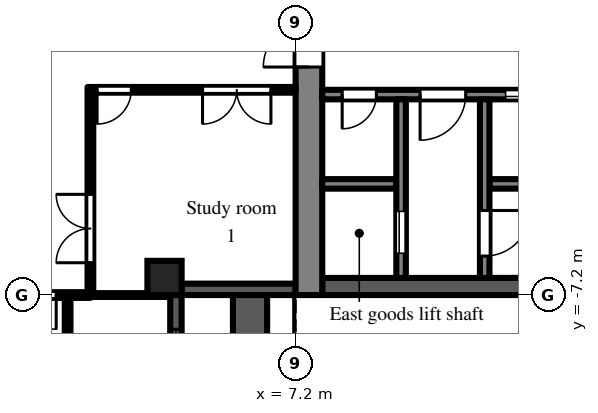
"""IFC4 building model, lengths in metres.
Left out: names, types, materials, properties, quantities, classifications, styles, units other than length and angle.
Written with IfcOpenShell. Run it as: python <this file> out.ifc"""

import sys

from ifc_helpers import new_model, si_unit, direction, frame, frame_2d, origin, origin_2d, place, context, subcontext, project, spatial, rectangle, extrude, element, fill, save


model = new_model("IFC4")
c1 = context("Model", 3, precision=1e-05, world=origin(), true_north=direction((0.0, 1.0)))
c2 = subcontext(c1, "Body", "Model", "MODEL_VIEW")
j1 = project(units=[si_unit("LENGTHUNIT", "METRE"), si_unit("PLANEANGLEUNIT", "RADIAN")], contexts=[c1])
p1 = place(None, origin())
s1 = spatial("IfcSite", under=j1, at=p1, CompositionType="ELEMENT")
p2 = place(p1, origin())
s2 = spatial("IfcBuilding", under=s1, at=p2, CompositionType="ELEMENT")
p3 = place(p2, frame((0.0, 0.0, 116.1)))
s3 = spatial("IfcBuildingStorey", under=s2, at=p3, CompositionType="ELEMENT", Elevation=116.1)
p4 = place(p3, frame((3.75, -6.75, 0.0), z_axis=(0.0, 0.0, 1.0), x_axis=(1.0, 0.0, 0.0)))
e1 = element("IfcColumn", 1, at=p4, inside=s3, PredefinedType="COLUMN", context=c2, shape_type="SweptSolid", body=[
    extrude(rectangle(XDim=0.9, YDim=0.9, at=origin_2d()), origin(), (0.0, 0.0, 1.0), 4.2),
])
p5 = place(p3, frame((4.05, -14.4, 0.0), z_axis=(0.0, 0.0, 1.0), x_axis=(0.0, 1.0, 0.0)))
e2 = element("IfcWall", 2, at=p5, inside=s3, PredefinedType="SOLIDWALL", context=c2, shape_type="SweptSolid", body=[
    extrude(rectangle(XDim=7.2, YDim=0.3, at=frame_2d((3.6, 0.0))), origin(), (0.0, 0.0, 1.0), 3.4),
])
p6 = place(p5, frame((3.0, 0.0, 0.0)))
e3 = element("IfcOpeningElement", 3, at=p6, cuts=e2, PredefinedType="OPENING", context=c2, shape_type="SweptSolid", body=[
    extrude(rectangle(XDim=1.2, YDim=2.05, at=frame_2d((0.6, 1.025))), frame((0.0, 0.16, 0.0), z_axis=(0.0, -1.0, 0.0), x_axis=(1.0, 0.0, 0.0)), (0.0, 0.0, 1.0), 0.32),
])
p7 = place(p5, frame((0.425, 0.0, 0.2)))
e4 = element("IfcOpeningElement", 4, at=p7, cuts=e2, PredefinedType="OPENING", context=c2, shape_type="SweptSolid", body=[
    extrude(rectangle(XDim=1.8, YDim=1.85, at=frame_2d((0.9, 0.925))), frame((0.0, 0.16, 0.0), z_axis=(0.0, -1.0, 0.0), x_axis=(1.0, 0.0, 0.0)), (0.0, 0.0, 1.0), 0.32),
])
p8 = place(p5, frame((4.5, 0.0, 0.2)))
e5 = element("IfcOpeningElement", 5, at=p8, cuts=e2, PredefinedType="OPENING", context=c2, shape_type="SweptSolid", body=[
    extrude(rectangle(XDim=1.8, YDim=1.85, at=frame_2d((0.9, 0.925))), frame((0.0, 0.16, 0.0), z_axis=(0.0, -1.0, 0.0), x_axis=(1.0, 0.0, 0.0)), (0.0, 0.0, 1.0), 0.32),
])
p9 = place(p3, frame((4.2, -7.05, 0.0), z_axis=(0.0, 0.0, 1.0), x_axis=(1.0, 0.0, 0.0)))
e6 = element("IfcWall", 6, at=p9, inside=s3, PredefinedType="SOLIDWALL", context=c2, shape_type="SweptSolid", body=[
    extrude(rectangle(XDim=3.0, YDim=0.3, at=frame_2d((1.5, 0.0))), origin(), (0.0, 0.0, 1.0), 3.4),
])
p10 = place(p3, frame((6.0, -14.4, 0.0), z_axis=(0.0, 0.0, 1.0), x_axis=(0.0, 1.0, 0.0)))
e7 = element("IfcWall", 7, at=p10, inside=s3, PredefinedType="PARAPET", context=c2, shape_type="SweptSolid", body=[
    extrude(rectangle(XDim=7.2, YDim=0.9, at=frame_2d((3.6, 0.0))), origin(), (0.0, 0.0, 1.0), 0.8),
])
p11 = place(p3, frame((7.55, -7.2, 0.0), z_axis=(0.0, 0.0, 1.0), x_axis=(0.0, 1.0, 0.0)))
e8 = element("IfcWall", 8, at=p11, inside=s3, PredefinedType="SHEAR", context=c2, shape_type="SweptSolid", body=[
    extrude(rectangle(XDim=14.4, YDim=0.7, at=frame_2d((7.2, 0.0))), origin(), (0.0, 0.0, 1.0), 3.8),
])
p12 = place(p11, frame((6.0, 0.0, 0.0)))
e9 = element("IfcOpeningElement", 9, at=p12, cuts=e8, PredefinedType="OPENING", context=c2, shape_type="SweptSolid", body=[
    extrude(rectangle(XDim=2.4, YDim=2.2, at=frame_2d((1.2, 1.1))), frame((0.0, 0.36, 0.0), z_axis=(0.0, -1.0, 0.0), x_axis=(1.0, 0.0, 0.0)), (0.0, 0.0, 1.0), 0.72),
])
p13 = place(p3, frame((7.9, -6.975, 0.0), z_axis=(0.0, 0.0, 1.0), x_axis=(1.0, 0.0, 0.0)))
e10 = element("IfcWall", 10, at=p13, inside=s3, PredefinedType="SHEAR", context=c2, shape_type="SweptSolid", body=[
    extrude(rectangle(XDim=12.95, YDim=0.45, at=frame_2d((6.475, 0.0))), origin(), (0.0, 0.0, 1.0), 3.8),
])
p14 = place(p3, frame((7.9, -1.925, 0.0), z_axis=(0.0, 0.0, 1.0), x_axis=(1.0, 0.0, 0.0)))
e11 = element("IfcWall", 11, at=p14, inside=s3, PredefinedType="SHEAR", context=c2, shape_type="SweptSolid", body=[
    extrude(rectangle(XDim=12.95, YDim=0.25, at=frame_2d((6.475, 0.0))), origin(), (0.0, 0.0, 1.0), 3.8),
])
p15 = place(p14, frame((4.825, 0.0, 0.0)))
e12 = element("IfcOpeningElement", 12, at=p15, cuts=e11, PredefinedType="OPENING", context=c2, shape_type="SweptSolid", body=[
    extrude(rectangle(XDim=1.1, YDim=2.1, at=frame_2d((0.55, 1.05))), frame((0.0, 0.135, 0.0), z_axis=(0.0, -1.0, 0.0), x_axis=(1.0, 0.0, 0.0)), (0.0, 0.0, 1.0), 0.27),
])
p16 = place(p14, frame((7.025, 0.0, 0.0)))
e13 = element("IfcOpeningElement", 13, at=p16, cuts=e11, PredefinedType="OPENING", context=c2, shape_type="SweptSolid", body=[
    extrude(rectangle(XDim=1.1, YDim=2.1, at=frame_2d((0.55, 1.05))), frame((0.0, 0.135, 0.0), z_axis=(0.0, -1.0, 0.0), x_axis=(1.0, 0.0, 0.0)), (0.0, 0.0, 1.0), 0.27),
])
p17 = place(p14, frame((9.225, 0.0, 0.0)))
e14 = element("IfcOpeningElement", 14, at=p17, cuts=e11, PredefinedType="OPENING", context=c2, shape_type="SweptSolid", body=[
    extrude(rectangle(XDim=1.1, YDim=2.1, at=frame_2d((0.55, 1.05))), frame((0.0, 0.135, 0.0), z_axis=(0.0, -1.0, 0.0), x_axis=(1.0, 0.0, 0.0)), (0.0, 0.0, 1.0), 0.27),
])
p18 = place(p14, frame((11.425, 0.0, 0.0)))
e15 = element("IfcOpeningElement", 15, at=p18, cuts=e11, PredefinedType="OPENING", context=c2, shape_type="SweptSolid", body=[
    extrude(rectangle(XDim=1.1, YDim=2.1, at=frame_2d((0.55, 1.05))), frame((0.0, 0.135, 0.0), z_axis=(0.0, -1.0, 0.0), x_axis=(1.0, 0.0, 0.0)), (0.0, 0.0, 1.0), 0.27),
])
p19 = place(p14, frame((0.525, 0.0, 0.0)))
e16 = element("IfcOpeningElement", 16, at=p19, cuts=e11, PredefinedType="OPENING", context=c2, shape_type="SweptSolid", body=[
    extrude(rectangle(XDim=0.9, YDim=2.1, at=frame_2d((0.45, 1.05))), frame((0.0, 0.135, 0.0), z_axis=(0.0, -1.0, 0.0), x_axis=(1.0, 0.0, 0.0)), (0.0, 0.0, 1.0), 0.27),
])
p20 = place(p14, frame((2.575, 0.0, 0.0)))
e17 = element("IfcOpeningElement", 17, at=p20, cuts=e11, PredefinedType="OPENING", context=c2, shape_type="SweptSolid", body=[
    extrude(rectangle(XDim=1.2, YDim=2.1, at=frame_2d((0.6, 1.05))), frame((0.0, 0.135, 0.0), z_axis=(0.0, -1.0, 0.0), x_axis=(1.0, 0.0, 0.0)), (0.0, 0.0, 1.0), 0.27),
])
p21 = place(p3, frame((7.9, -4.275, 0.0), z_axis=(0.0, 0.0, 1.0), x_axis=(1.0, 0.0, 0.0)))
e18 = element("IfcWall", 18, at=p21, inside=s3, PredefinedType="SHEAR", context=c2, shape_type="SweptSolid", body=[
    extrude(rectangle(XDim=1.95, YDim=0.25, at=frame_2d((0.975, 0.0))), origin(), (0.0, 0.0, 1.0), 3.8),
])
p22 = place(p3, frame((12.3, -4.275, 0.0), z_axis=(0.0, 0.0, 1.0), x_axis=(1.0, 0.0, 0.0)))
e19 = element("IfcWall", 19, at=p22, inside=s3, PredefinedType="SHEAR", context=c2, shape_type="SweptSolid", body=[
    extrude(rectangle(XDim=8.55, YDim=0.25, at=frame_2d((4.275, 0.0))), origin(), (0.0, 0.0, 1.0), 3.8),
])
p23 = place(p3, frame((9.975, -2.05, 0.0), z_axis=(0.0, 0.0, 1.0), x_axis=(0.0, -1.0, 0.0)))
e20 = element("IfcWall", 20, at=p23, inside=s3, PredefinedType="SHEAR", context=c2, shape_type="SweptSolid", body=[
    extrude(rectangle(XDim=4.7, YDim=0.25, at=frame_2d((2.35, 0.0))), origin(), (0.0, 0.0, 1.0), 3.8),
])
p24 = place(p23, frame((2.95, 0.0, 0.0)))
e21 = element("IfcOpeningElement", 21, at=p24, cuts=e20, PredefinedType="OPENING", context=c2, shape_type="SweptSolid", body=[
    extrude(rectangle(XDim=1.1, YDim=2.1, at=frame_2d((0.55, 1.05))), frame((0.0, 0.135, 0.0), z_axis=(0.0, -1.0, 0.0), x_axis=(1.0, 0.0, 0.0)), (0.0, 0.0, 1.0), 0.27),
])
p25 = place(p3, frame((12.175, -2.05, 0.0), z_axis=(0.0, 0.0, 1.0), x_axis=(0.0, -1.0, 0.0)))
e22 = element("IfcWall", 22, at=p25, inside=s3, PredefinedType="SHEAR", context=c2, shape_type="SweptSolid", body=[
    extrude(rectangle(XDim=4.7, YDim=0.25, at=frame_2d((2.35, 0.0))), origin(), (0.0, 0.0, 1.0), 3.8),
])
p26 = place(p25, frame((2.925, 0.0, 0.0)))
e23 = element("IfcOpeningElement", 23, at=p26, cuts=e22, PredefinedType="OPENING", context=c2, shape_type="SweptSolid", body=[
    extrude(rectangle(XDim=1.2, YDim=2.1, at=frame_2d((0.6, 1.05))), frame((0.0, 0.135, 0.0), z_axis=(0.0, -1.0, 0.0), x_axis=(1.0, 0.0, 0.0)), (0.0, 0.0, 1.0), 0.27),
])
p27 = place(p3, frame((-3.9, -7.2, 0.0), z_axis=(0.0, 0.0, 1.0), x_axis=(1.0, 0.0, 0.0)))
e24 = element("IfcWall", 24, at=p27, inside=s3, PredefinedType="PARTITIONING", context=c2, shape_type="SweptSolid", body=[
    extrude(rectangle(XDim=5.7, YDim=0.15, at=frame_2d((2.85, 0.0))), origin(), (0.0, 0.0, 1.0), 3.8),
])
p28 = place(p27, frame((3.0, 0.0, 0.0)))
e25 = element("IfcOpeningElement", 25, at=p28, cuts=e24, PredefinedType="OPENING", context=c2, shape_type="SweptSolid", body=[
    extrude(rectangle(XDim=1.8, YDim=2.1, at=frame_2d((0.9, 1.05))), frame((0.0, 0.085, 0.0), z_axis=(0.0, -1.0, 0.0), x_axis=(1.0, 0.0, 0.0)), (0.0, 0.0, 1.0), 0.17),
])
p29 = place(p3, frame((1.2, -16.725, 0.0), z_axis=(0.0, 0.0, 1.0), x_axis=(0.0, 1.0, 0.0)))
e26 = element("IfcWall", 26, at=p29, inside=s3, PredefinedType="PARTITIONING", context=c2, shape_type="SweptSolid", body=[
    extrude(rectangle(XDim=9.45, YDim=0.15, at=frame_2d((4.725, 0.0))), origin(), (0.0, 0.0, 1.0), 3.8),
])
p30 = place(p29, frame((6.625, 0.0, 0.0)))
e27 = element("IfcOpeningElement", 27, at=p30, cuts=e26, PredefinedType="OPENING", context=c2, shape_type="SweptSolid", body=[
    extrude(rectangle(XDim=1.0, YDim=2.1, at=frame_2d((0.5, 1.05))), frame((0.0, 0.085, 0.0), z_axis=(0.0, -1.0, 0.0), x_axis=(1.0, 0.0, 0.0)), (0.0, 0.0, 1.0), 0.17),
])
p31 = place(p29, frame((1.825, 0.0, 0.0)))
e28 = element("IfcOpeningElement", 28, at=p31, cuts=e26, PredefinedType="OPENING", context=c2, shape_type="SweptSolid", body=[
    extrude(rectangle(XDim=1.0, YDim=2.1, at=frame_2d((0.5, 1.05))), frame((0.0, 0.085, 0.0), z_axis=(0.0, -1.0, 0.0), x_axis=(1.0, 0.0, 0.0)), (0.0, 0.0, 1.0), 0.17),
])
p32 = place(p3, frame((1.8, -7.125, 0.0), z_axis=(0.0, 0.0, 1.0), x_axis=(0.0, 1.0, 0.0)))
e29 = element("IfcWall", 29, at=p32, inside=s3, PredefinedType="PARTITIONING", context=c2, shape_type="SweptSolid", body=[
    extrude(rectangle(XDim=5.4, YDim=0.15, at=frame_2d((2.7, 0.0))), origin(), (0.0, 0.0, 1.0), 3.8),
])
p33 = place(p32, frame((0.775, 0.0, 0.0)))
e30 = element("IfcOpeningElement", 30, at=p33, cuts=e29, PredefinedType="OPENING", context=c2, shape_type="SweptSolid", body=[
    extrude(rectangle(XDim=1.8, YDim=2.1, at=frame_2d((0.9, 1.05))), frame((0.0, 0.085, 0.0), z_axis=(0.0, -1.0, 0.0), x_axis=(1.0, 0.0, 0.0)), (0.0, 0.0, 1.0), 0.17),
])
p34 = place(p3, frame((1.8, -7.2, 0.0), z_axis=(0.0, 0.0, 1.0), x_axis=(1.0, 0.0, 0.0)))
e31 = element("IfcWall", 31, at=p34, inside=s3, PredefinedType="PARTITIONING", context=c2, shape_type="SweptSolid", body=[
    extrude(rectangle(XDim=2.1, YDim=0.1, at=frame_2d((1.05, 0.0))), origin(), (0.0, 0.0, 1.0), 3.8),
])
p35 = place(p3, frame((1.875, -1.8, 0.0), z_axis=(0.0, 0.0, 1.0), x_axis=(1.0, 0.0, 0.0)))
e32 = element("IfcWall", 32, at=p35, inside=s3, PredefinedType="PARTITIONING", context=c2, shape_type="SweptSolid", body=[
    extrude(rectangle(XDim=5.325, YDim=0.15, at=frame_2d((2.663, 0.0))), origin(), (0.0, 0.0, 1.0), 3.8),
])
p36 = place(p35, frame((0.1, 0.0, 0.0)))
e33 = element("IfcOpeningElement", 33, at=p36, cuts=e32, PredefinedType="OPENING", context=c2, shape_type="SweptSolid", body=[
    extrude(rectangle(XDim=0.9, YDim=2.1, at=frame_2d((0.45, 1.05))), frame((0.0, 0.085, 0.0), z_axis=(0.0, -1.0, 0.0), x_axis=(1.0, 0.0, 0.0)), (0.0, 0.0, 1.0), 0.17),
])
p37 = place(p35, frame((2.875, 0.0, 0.0)))
e34 = element("IfcOpeningElement", 34, at=p37, cuts=e32, PredefinedType="OPENING", context=c2, shape_type="SweptSolid", body=[
    extrude(rectangle(XDim=1.8, YDim=2.1, at=frame_2d((0.9, 1.05))), frame((0.0, 0.085, 0.0), z_axis=(0.0, -1.0, 0.0), x_axis=(1.0, 0.0, 0.0)), (0.0, 0.0, 1.0), 0.17),
])
p38 = place(p8, origin())
e35 = element("IfcWindow", 35, at=p38, inside=s3, PartitioningType="SINGLE_PANEL", PredefinedType="WINDOW", context=c2, shape_type="SweptSolid", body=[
    extrude(rectangle(XDim=1.8, YDim=1.85, at=frame_2d((0.9, 0.925))), frame((0.0, 0.03, 0.0), z_axis=(0.0, -1.0, 0.0), x_axis=(1.0, 0.0, 0.0)), (0.0, 0.0, 1.0), 0.06),
])
fill(e5, e35)
p39 = place(p15, origin())
e36 = element("IfcDoor", 36, at=p39, inside=s3, OperationType="SLIDING_TO_LEFT", PredefinedType="DOOR", context=c2, shape_type="SweptSolid", body=[
    extrude(rectangle(XDim=1.1, YDim=2.1, at=frame_2d((0.55, 1.05))), frame((0.0, 0.025, 0.0), z_axis=(0.0, -1.0, 0.0), x_axis=(1.0, 0.0, 0.0)), (0.0, 0.0, 1.0), 0.05),
])
fill(e12, e36)
p40 = place(p24, origin())
e37 = element("IfcDoor", 37, at=p40, inside=s3, OperationType="SLIDING_TO_LEFT", PredefinedType="DOOR", context=c2, shape_type="SweptSolid", body=[
    extrude(rectangle(XDim=1.1, YDim=2.1, at=frame_2d((0.55, 1.05))), frame((0.0, 0.025, 0.0), z_axis=(0.0, -1.0, 0.0), x_axis=(1.0, 0.0, 0.0)), (0.0, 0.0, 1.0), 0.05),
])
fill(e21, e37)
p41 = place(p26, origin())
e38 = element("IfcDoor", 38, at=p41, inside=s3, OperationType="SINGLE_SWING_LEFT", PredefinedType="DOOR", context=c2, shape_type="SweptSolid", body=[
    extrude(rectangle(XDim=1.2, YDim=2.1, at=frame_2d((0.6, 1.05))), frame((0.0, 0.025, 0.0), z_axis=(0.0, -1.0, 0.0), x_axis=(1.0, 0.0, 0.0)), (0.0, 0.0, 1.0), 0.05),
])
fill(e23, e38)
p42 = place(p19, frame((0.9, 0.0, 0.0), z_axis=(0.0, 0.0, 1.0), x_axis=(-1.0, 0.0, 0.0)))
e39 = element("IfcDoor", 39, at=p42, inside=s3, OperationType="SINGLE_SWING_RIGHT", PredefinedType="DOOR", context=c2, shape_type="SweptSolid", body=[
    extrude(rectangle(XDim=0.9, YDim=2.1, at=frame_2d((0.45, 1.05))), frame((0.0, 0.025, 0.0), z_axis=(0.0, -1.0, 0.0), x_axis=(1.0, 0.0, 0.0)), (0.0, 0.0, 1.0), 0.05),
])
fill(e16, e39)
p43 = place(p20, frame((1.2, 0.0, 0.0), z_axis=(0.0, 0.0, 1.0), x_axis=(-1.0, 0.0, 0.0)))
e40 = element("IfcDoor", 40, at=p43, inside=s3, OperationType="SINGLE_SWING_RIGHT", PredefinedType="DOOR", context=c2, shape_type="SweptSolid", body=[
    extrude(rectangle(XDim=1.2, YDim=2.1, at=frame_2d((0.6, 1.05))), frame((0.0, 0.025, 0.0), z_axis=(0.0, -1.0, 0.0), x_axis=(1.0, 0.0, 0.0)), (0.0, 0.0, 1.0), 0.05),
])
fill(e17, e40)
p44 = place(p12, origin())
e41 = element("IfcDoor", 41, at=p44, inside=s3, OperationType="DOUBLE_DOOR_DOUBLE_SWING", PredefinedType="DOOR", context=c2, shape_type="SweptSolid", body=[
    extrude(rectangle(XDim=2.4, YDim=2.2, at=frame_2d((1.2, 1.1))), frame((0.0, 0.025, 0.0), z_axis=(0.0, -1.0, 0.0), x_axis=(1.0, 0.0, 0.0)), (0.0, 0.0, 1.0), 0.05),
])
fill(e9, e41)
p45 = place(p33, origin())
e42 = element("IfcDoor", 42, at=p45, inside=s3, OperationType="DOUBLE_DOOR_DOUBLE_SWING", PredefinedType="DOOR", context=c2, shape_type="SweptSolid", body=[
    extrude(rectangle(XDim=1.8, YDim=2.1, at=frame_2d((0.9, 1.05))), frame((0.0, 0.025, 0.0), z_axis=(0.0, -1.0, 0.0), x_axis=(1.0, 0.0, 0.0)), (0.0, 0.0, 1.0), 0.05),
])
fill(e30, e42)
p46 = place(p36, frame((0.9, 0.0, 0.0), z_axis=(0.0, 0.0, 1.0), x_axis=(-1.0, 0.0, 0.0)))
e43 = element("IfcDoor", 43, at=p46, inside=s3, OperationType="SINGLE_SWING_RIGHT", PredefinedType="DOOR", context=c2, shape_type="SweptSolid", body=[
    extrude(rectangle(XDim=0.9, YDim=2.1, at=frame_2d((0.45, 1.05))), frame((0.0, 0.025, 0.0), z_axis=(0.0, -1.0, 0.0), x_axis=(1.0, 0.0, 0.0)), (0.0, 0.0, 1.0), 0.05),
])
fill(e33, e43)
p47 = place(p37, frame((1.8, 0.0, 0.0), z_axis=(0.0, 0.0, 1.0), x_axis=(-1.0, 0.0, 0.0)))
e44 = element("IfcDoor", 44, at=p47, inside=s3, OperationType="DOUBLE_DOOR_DOUBLE_SWING", PredefinedType="DOOR", context=c2, shape_type="SweptSolid", body=[
    extrude(rectangle(XDim=1.8, YDim=2.1, at=frame_2d((0.9, 1.05))), frame((0.0, 0.025, 0.0), z_axis=(0.0, -1.0, 0.0), x_axis=(1.0, 0.0, 0.0)), (0.0, 0.0, 1.0), 0.05),
])
fill(e34, e44)
p48 = place(p28, frame((1.8, 0.0, 0.0), z_axis=(0.0, 0.0, 1.0), x_axis=(-1.0, 0.0, 0.0)))
e45 = element("IfcDoor", 45, at=p48, inside=s3, OperationType="DOUBLE_DOOR_DOUBLE_SWING", PredefinedType="DOOR", context=c2, shape_type="SweptSolid", body=[
    extrude(rectangle(XDim=1.8, YDim=2.1, at=frame_2d((0.9, 1.05))), frame((0.0, 0.025, 0.0), z_axis=(0.0, -1.0, 0.0), x_axis=(1.0, 0.0, 0.0)), (0.0, 0.0, 1.0), 0.05),
])
fill(e25, e45)
save(model, sys.argv[1])
